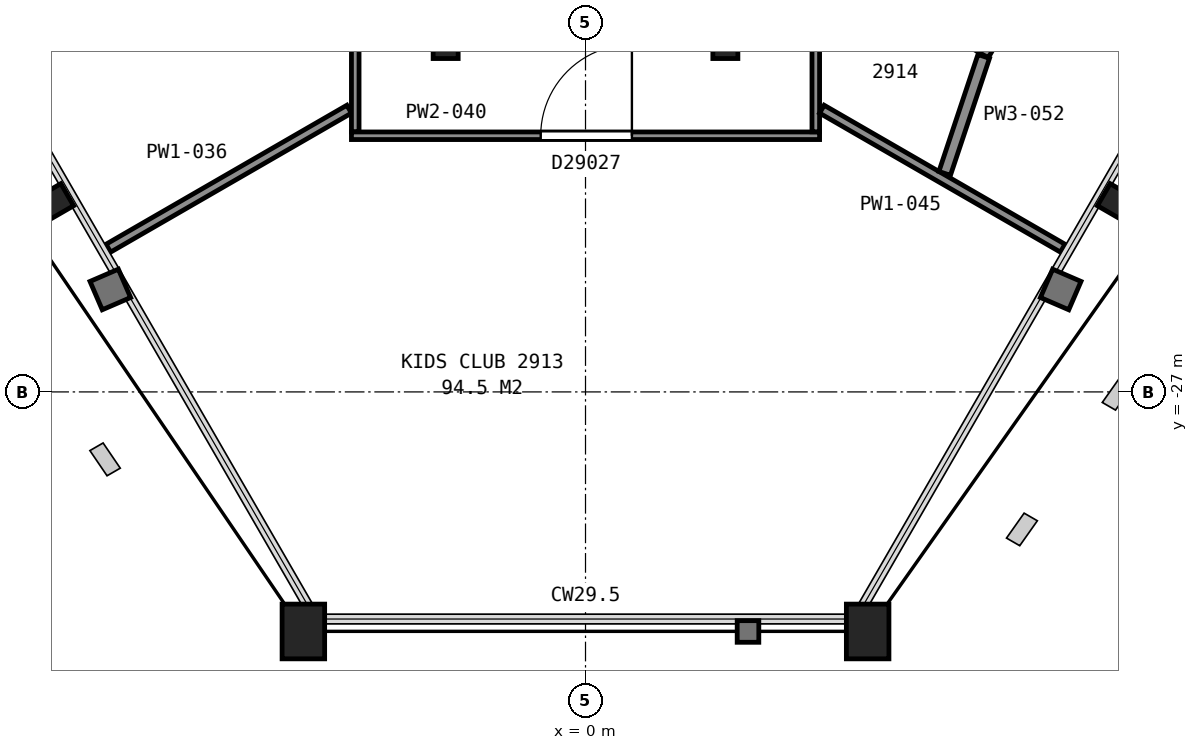
"""IFC4 building model, lengths in metres.
Left out: names, types, materials, properties, quantities, classifications, styles, units other than length and angle.
Written with IfcOpenShell. Run it as: python <this file> out.ifc"""

import sys

from ifc_helpers import new_model, si_unit, direction, frame, frame_2d, origin, origin_2d, place, context, subcontext, project, spatial, rectangle, hollow_rectangle, i_section, extrude, element, fill, save


model = new_model("IFC4")
c1 = context("Model", 3, precision=1e-05, world=origin(), true_north=direction((0.0, 1.0)))
c2 = subcontext(c1, "Body", "Model", "MODEL_VIEW")
j1 = project(units=[si_unit("LENGTHUNIT", "METRE"), si_unit("PLANEANGLEUNIT", "RADIAN")], contexts=[c1])
p1 = place(None, origin())
s1 = spatial("IfcSite", under=j1, at=p1, CompositionType="ELEMENT")
p2 = place(p1, origin())
s2 = spatial("IfcBuilding", under=s1, at=p2, CompositionType="ELEMENT")
p3 = place(p2, frame((0.0, 0.0, 121.6)))
s3 = spatial("IfcBuildingStorey", under=s2, at=p3, CompositionType="ELEMENT", Elevation=121.6)
p4 = place(p3, frame((-8.72, -23.87, 0.045), z_axis=(0.0, 0.0, 1.0), x_axis=(-0.5, 0.866025403784, 0.0)))
e1 = element("IfcColumn", 1, at=p4, inside=s3, PredefinedType="COLUMN", context=c2, shape_type="SweptSolid", body=[
    extrude(i_section(OverallWidth=0.419, OverallDepth=0.455, WebThickness=0.042, FlangeThickness=0.068, FilletRadius=0.015, at=origin_2d()), origin(), (0.0, 0.0, 1.0), 3.555),
])
for number, where, z_axis, x_axis in (
    (2, (-4.64, -30.94, 0.075), (0.0, 0.0, 1.0), (-1.0, 0.0, 0.0)),
    (3, (4.64, -30.94, 0.075), (0.0, 0.0, 1.0), (-1.0, 0.0, 0.0)),
):
    element("IfcColumn", number, at=place(p3, frame(where, z_axis=z_axis, x_axis=x_axis)), inside=s3, PredefinedType="COLUMN", context=c2, shape_type="SweptSolid", body=[
        extrude(hollow_rectangle(XDim=0.7, YDim=0.9, WallThickness=0.065, at=origin_2d()), origin(), (0.0, 0.0, 1.0), 3.525),
    ])
p5 = place(p3, frame((8.72, -23.87, 0.045), z_axis=(0.0, 0.0, 1.0), x_axis=(-0.5, -0.866025403784, 0.0)))
e4 = element("IfcColumn", 4, at=p5, inside=s3, PredefinedType="COLUMN", context=c2, shape_type="SweptSolid", body=[
    extrude(i_section(OverallWidth=0.419, OverallDepth=0.455, WebThickness=0.042, FlangeThickness=0.068, FilletRadius=0.015, at=origin_2d()), origin(), (0.0, 0.0, 1.0), 3.555),
])
for number, where, z_axis, x_axis in (
    (5, (-2.3, -21.3, 0.0), (0.0, 0.0, 1.0), (-1.0, 0.0, 0.0)),
    (6, (2.3, -21.3, 0.0), (0.0, 0.0, 1.0), (-1.0, 0.0, 0.0)),
):
    element("IfcColumn", number, at=place(p3, frame(where, z_axis=z_axis, x_axis=x_axis)), inside=s3, PredefinedType="COLUMN", context=c2, shape_type="SweptSolid", body=[
        extrude(i_section(OverallWidth=0.411, OverallDepth=0.434, WebThickness=0.036, FlangeThickness=0.057, FilletRadius=0.015, at=origin_2d()), origin(), (0.0, 0.0, 1.0), 3.6),
    ])
p6 = place(p3, frame((-7.848, -24.636, 0.0), z_axis=(0.0, 0.0, 1.0), x_axis=(0.866046917185, 0.499962735845, 0.0)))
e7 = element("IfcWall", 7, at=p6, inside=s3, PredefinedType="PARTITIONING", context=c2, shape_type="SweptSolid", body=[
    extrude(rectangle(XDim=4.573, YDim=0.15, at=frame_2d((2.287, 0.0))), origin(), (0.0, 0.0, 1.0), 2.613),
])
p7 = place(p3, frame((-3.787, -22.722, 0.0), z_axis=(0.0, 0.0, 1.0), x_axis=(0.0, 1.0, 0.0)))
e8 = element("IfcWall", 8, at=p7, inside=s3, PredefinedType="PARTITIONING", context=c2, shape_type="SweptSolid", body=[
    extrude(rectangle(XDim=7.197, YDim=0.125, at=frame_2d((3.599, 0.0))), origin(), (0.0, 0.0, 1.0), 2.613),
])
p8 = place(p7, frame((2.58, 0.0, 0.0)))
e9 = element("IfcOpeningElement", 9, at=p8, cuts=e8, PredefinedType="OPENING", context=c2, shape_type="SweptSolid", body=[
    extrude(rectangle(XDim=1.0, YDim=2.1, at=frame_2d((0.5, 1.05))), frame((0.0, 0.073, 0.0), z_axis=(0.0, -1.0, 0.0), x_axis=(1.0, 0.0, 0.0)), (0.0, 0.0, 1.0), 0.145),
])
p9 = place(p3, frame((3.85, -22.787, 0.0), z_axis=(0.0, 0.0, 1.0), x_axis=(-1.0, 0.0, 0.0)))
e10 = element("IfcWall", 10, at=p9, inside=s3, PredefinedType="PARTITIONING", context=c2, shape_type="SweptSolid", body=[
    extrude(rectangle(XDim=7.699, YDim=0.125, at=frame_2d((3.85, 0.0))), origin(), (0.0, 0.0, 1.0), 2.613),
])
p10 = place(p9, frame((3.086, 0.0, 0.0)))
e11 = element("IfcOpeningElement", 11, at=p10, cuts=e10, PredefinedType="OPENING", context=c2, shape_type="SweptSolid", body=[
    extrude(rectangle(XDim=1.5, YDim=2.1, at=frame_2d((0.75, 1.05))), frame((0.0, 0.073, 0.0), z_axis=(0.0, -1.0, 0.0), x_axis=(1.0, 0.0, 0.0)), (0.0, 0.0, 1.0), 0.145),
])
p11 = place(p3, frame((3.787, -15.525, 0.0), z_axis=(0.0, 0.0, 1.0), x_axis=(0.0, -1.0, 0.0)))
e12 = element("IfcWall", 12, at=p11, inside=s3, PredefinedType="PARTITIONING", context=c2, shape_type="SweptSolid", body=[
    extrude(rectangle(XDim=7.197, YDim=0.125, at=frame_2d((3.599, 0.0))), origin(), (0.0, 0.0, 1.0), 2.613),
])
p12 = place(p11, frame((2.177, 0.0, 0.0)))
e13 = element("IfcOpeningElement", 13, at=p12, cuts=e12, PredefinedType="OPENING", context=c2, shape_type="SweptSolid", body=[
    extrude(rectangle(XDim=0.9, YDim=2.1, at=frame_2d((0.45, 1.05))), frame((0.0, 0.073, 0.0), z_axis=(0.0, -1.0, 0.0), x_axis=(1.0, 0.0, 0.0)), (0.0, 0.0, 1.0), 0.145),
])
p13 = place(p3, frame((3.887, -22.35, 0.0), z_axis=(0.0, 0.0, 1.0), x_axis=(0.866046917185, -0.499962735845, 0.0)))
e14 = element("IfcWall", 14, at=p13, inside=s3, PredefinedType="PARTITIONING", context=c2, shape_type="SweptSolid", body=[
    extrude(rectangle(XDim=4.573, YDim=0.15, at=frame_2d((2.287, 0.0))), origin(), (0.0, 0.0, 1.0), 2.613),
])
p14 = place(p3, frame((6.674, -21.418, 0.0), z_axis=(0.0, 0.0, 1.0), x_axis=(-0.866105631149, 0.499861016376, 0.0)))
e15 = element("IfcWall", 15, at=p14, inside=s3, PredefinedType="PARTITIONING", context=c2, shape_type="SweptSolid", body=[
    extrude(rectangle(XDim=3.203, YDim=0.2, at=frame_2d((1.602, 0.0))), origin(), (0.0, 0.0, 1.0), 2.613),
])
p15 = place(p14, frame((1.333, 0.0, 0.0)))
e16 = element("IfcOpeningElement", 16, at=p15, cuts=e15, PredefinedType="OPENING", context=c2, shape_type="SweptSolid", body=[
    extrude(rectangle(XDim=0.8, YDim=2.1, at=frame_2d((0.4, 1.05))), frame((0.0, 0.11, 0.0), z_axis=(0.0, -1.0, 0.0), x_axis=(1.0, 0.0, 0.0)), (0.0, 0.0, 1.0), 0.22),
])
p16 = place(p3, frame((5.907, -23.406, 0.0), z_axis=(0.0, 0.0, 1.0), x_axis=(0.316661020634, 0.948538769904, 0.0)))
e17 = element("IfcWall", 17, at=p16, inside=s3, PredefinedType="PARTITIONING", context=c2, shape_type="SweptSolid", body=[
    extrude(rectangle(XDim=2.029, YDim=0.2, at=frame_2d((1.014, 0.0))), origin(), (0.0, 0.0, 1.0), 2.613),
])
p17 = place(p10, origin())
e18 = element("IfcDoor", 18, at=p17, inside=s3, OperationType="DOUBLE_DOOR_SINGLE_SWING", PredefinedType="DOOR", context=c2, shape_type="SweptSolid", body=[
    extrude(rectangle(XDim=1.5, YDim=2.1, at=frame_2d((0.75, 1.05))), frame((0.0, 0.025, 0.0), z_axis=(0.0, -1.0, 0.0), x_axis=(1.0, 0.0, 0.0)), (0.0, 0.0, 1.0), 0.05),
])
fill(e11, e18)
save(model, sys.argv[1])
